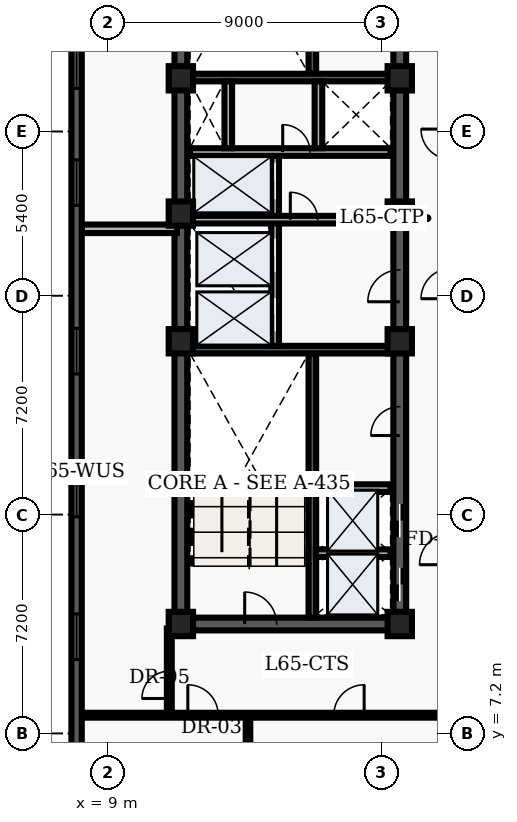
"""IFC4 building model, lengths in metres.
Left out: names, types, materials, properties, quantities, classifications, styles, units other than length and angle.
Written with IfcOpenShell. Run it as: python <this file> out.ifc"""

import sys

from ifc_helpers import new_model, entity, si_unit, converted_unit, direction, frame, origin_with_axes, origin_2d_with_axis, place, context, subcontext, project, spatial, polyline, rectangle, outline, extrude, element, fill, save


model = new_model("IFC4")
c1 = context("Model", 3, precision=1e-05, world=origin_with_axes(), true_north=direction((0.0, 1.0)))
c2 = subcontext(c1, "Body", "Model", "MODEL_VIEW")
j1 = project(units=[si_unit("LENGTHUNIT", "METRE"), converted_unit("PLANEANGLEUNIT", "DEGREE", entity("IfcPlaneAngleMeasure", 0.017), si_unit("PLANEANGLEUNIT", "RADIAN"), dimensions=[0, 0, 0, 0, 0, 0, 0])], contexts=[c1])
p1 = place(None, origin_with_axes())
s1 = spatial("IfcSite", under=j1, at=p1, CompositionType="ELEMENT")
p2 = place(p1, origin_with_axes())
s2 = spatial("IfcBuilding", under=s1, at=p2, CompositionType="ELEMENT")
p3 = place(p2, frame((0.0, 0.0, 264.6), z_axis=(0.0, 0.0, 1.0), x_axis=(1.0, 0.0, 0.0)))
s3 = spatial("IfcBuildingStorey", under=s2, at=p3, CompositionType="ELEMENT", Elevation=264.6)
p4 = place(p3, frame((11.4, 10.8, 0.0), z_axis=(0.0, 0.0, 1.0), x_axis=(0.0, 1.0, 0.0)))
e1 = element("IfcWall", 1, at=p4, inside=s3, PredefinedType="SHEAR", context=c2, shape_type="SweptSolid", body=[
    extrude(outline(polyline([(0.0, -0.21), (27.0, -0.21), (27.0, 0.21), (0.0, 0.21), (0.0, -0.21)])), origin_with_axes(), (0.0, 0.0, 1.0), 3.66),
])
p5 = place(p3, frame((11.4, 10.8, 0.0), z_axis=(0.0, 0.0, 1.0), x_axis=(1.0, 0.0, 0.0)))
e2 = element("IfcWall", 2, at=p5, inside=s3, PredefinedType="SHEAR", context=c2, shape_type="SweptSolid", body=[
    extrude(outline(polyline([(0.0, -0.21), (7.2, -0.21), (7.2, 0.21), (0.0, 0.21), (0.0, -0.21)])), origin_with_axes(), (0.0, 0.0, 1.0), 3.66),
])
p6 = place(p5, frame((2.625, 0.0, 0.0), z_axis=(0.0, 0.0, 1.0), x_axis=(1.0, 0.0, 0.0)))
e3 = element("IfcOpeningElement", 3, at=p6, cuts=e2, PredefinedType="OPENING", context=c2, shape_type="SweptSolid", body=[
    extrude(rectangle(XDim=1.05, YDim=0.44, at=origin_2d_with_axis()), origin_with_axes(), (0.0, 0.0, 1.0), 2.15),
])
p7 = place(p3, frame((18.6, 10.8, 0.0), z_axis=(0.0, 0.0, 1.0), x_axis=(0.0, 1.0, 0.0)))
e4 = element("IfcWall", 4, at=p7, inside=s3, PredefinedType="SHEAR", context=c2, shape_type="SweptSolid", body=[
    extrude(outline(polyline([(0.0, -0.21), (13.5, -0.21), (13.5, 0.21), (0.0, 0.21), (0.0, -0.21)])), origin_with_axes(), (0.0, 0.0, 1.0), 3.66),
])
p8 = place(p7, frame((1.3, 0.0, 0.0), z_axis=(0.0, 0.0, 1.0), x_axis=(1.0, 0.0, 0.0)))
e5 = element("IfcOpeningElement", 5, at=p8, cuts=e4, PredefinedType="OPENING", context=c2, shape_type="SweptSolid", body=[
    extrude(rectangle(XDim=1.1, YDim=0.44, at=origin_2d_with_axis()), origin_with_axes(), (0.0, 0.0, 1.0), 2.15),
])
p9 = place(p7, frame((3.4, 0.0, 0.0), z_axis=(0.0, 0.0, 1.0), x_axis=(1.0, 0.0, 0.0)))
e6 = element("IfcOpeningElement", 6, at=p9, cuts=e4, PredefinedType="OPENING", context=c2, shape_type="SweptSolid", body=[
    extrude(rectangle(XDim=1.1, YDim=0.44, at=origin_2d_with_axis()), origin_with_axes(), (0.0, 0.0, 1.0), 2.15),
])
p10 = place(p7, frame((11.125, 0.0, 0.0), z_axis=(0.0, 0.0, 1.0), x_axis=(1.0, 0.0, 0.0)))
e7 = element("IfcOpeningElement", 7, at=p10, cuts=e4, PredefinedType="OPENING", context=c2, shape_type="SweptSolid", body=[
    extrude(rectangle(XDim=1.05, YDim=0.44, at=origin_2d_with_axis()), origin_with_axes(), (0.0, 0.0, 1.0), 2.15),
])
p11 = place(p7, frame((6.675, 0.0, 0.0), z_axis=(0.0, 0.0, 1.0), x_axis=(1.0, 0.0, 0.0)))
e8 = element("IfcOpeningElement", 8, at=p11, cuts=e4, PredefinedType="OPENING", context=c2, shape_type="SweptSolid", body=[
    extrude(rectangle(XDim=0.95, YDim=0.44, at=origin_2d_with_axis()), origin_with_axes(), (0.0, 0.0, 1.0), 2.15),
])
p12 = place(p3, frame((18.6, 24.3, 0.0), z_axis=(0.0, 0.0, 1.0), x_axis=(0.0, 1.0, 0.0)))
e9 = element("IfcWall", 9, at=p12, inside=s3, PredefinedType="SHEAR", context=c2, shape_type="SweptSolid", body=[
    extrude(outline(polyline([(0.0, -0.21), (13.5, -0.21), (13.5, 0.21), (0.0, 0.21), (0.0, -0.21)])), origin_with_axes(), (0.0, 0.0, 1.0), 3.66),
])
p13 = place(p12, frame((8.525, 0.0, 0.0), z_axis=(0.0, 0.0, 1.0), x_axis=(1.0, 0.0, 0.0)))
e10 = element("IfcOpeningElement", 10, at=p13, cuts=e9, PredefinedType="OPENING", context=c2, shape_type="SweptSolid", body=[
    extrude(rectangle(XDim=1.05, YDim=0.44, at=origin_2d_with_axis()), origin_with_axes(), (0.0, 0.0, 1.0), 2.15),
])
p14 = place(p3, frame((15.725, 11.01, 0.0), z_axis=(0.0, 0.0, 1.0), x_axis=(0.0, 1.0, 0.0)))
e11 = element("IfcWall", 11, at=p14, inside=s3, PredefinedType="SHEAR", context=c2, shape_type="SweptSolid", body=[
    extrude(outline(polyline([(0.0, -0.125), (8.69, -0.125), (8.69, 0.125), (0.0, 0.125), (0.0, -0.125)])), origin_with_axes(), (0.0, 0.0, 1.0), 3.66),
])
p15 = place(p3, frame((11.61, 19.825, 0.0), z_axis=(0.0, 0.0, 1.0), x_axis=(1.0, 0.0, 0.0)))
e12 = element("IfcWall", 12, at=p15, inside=s3, PredefinedType="SHEAR", context=c2, shape_type="SweptSolid", body=[
    extrude(outline(polyline([(0.0, -0.125), (6.78, -0.125), (6.78, 0.125), (0.0, 0.125), (0.0, -0.125)])), origin_with_axes(), (0.0, 0.0, 1.0), 3.66),
])
p16 = place(p3, frame((15.725, 28.9, 0.0), z_axis=(0.0, 0.0, 1.0), x_axis=(0.0, 1.0, 0.0)))
e13 = element("IfcWall", 13, at=p16, inside=s3, PredefinedType="SHEAR", context=c2, shape_type="SweptSolid", body=[
    extrude(outline(polyline([(0.0, -0.125), (8.69, -0.125), (8.69, 0.125), (0.0, 0.125), (0.0, -0.125)])), origin_with_axes(), (0.0, 0.0, 1.0), 3.66),
])
p17 = place(p3, frame((11.61, 28.775, 0.0), z_axis=(0.0, 0.0, 1.0), x_axis=(1.0, 0.0, 0.0)))
e14 = element("IfcWall", 14, at=p17, inside=s3, PredefinedType="SHEAR", context=c2, shape_type="SweptSolid", body=[
    extrude(outline(polyline([(0.0, -0.125), (6.78, -0.125), (6.78, 0.125), (0.0, 0.125), (0.0, -0.125)])), origin_with_axes(), (0.0, 0.0, 1.0), 3.66),
])
p18 = place(p3, frame((14.5, 19.95, 0.0), z_axis=(0.0, 0.0, 1.0), x_axis=(0.0, 1.0, 0.0)))
e15 = element("IfcWall", 15, at=p18, inside=s3, PredefinedType="SOLIDWALL", context=c2, shape_type="SweptSolid", body=[
    extrude(outline(polyline([(0.0, -0.125), (6.25, -0.125), (6.25, 0.125), (0.0, 0.125), (0.0, -0.125)])), origin_with_axes(), (0.0, 0.0, 1.0), 2.7),
])
p19 = place(p18, frame((1.025, 0.0, 0.0), z_axis=(0.0, 0.0, 1.0), x_axis=(1.0, 0.0, 0.0)))
e16 = element("IfcOpeningElement", 16, at=p19, cuts=e15, PredefinedType="OPENING", context=c2, shape_type="SweptSolid", body=[
    extrude(rectangle(XDim=1.1, YDim=0.27, at=origin_2d_with_axis()), origin_with_axes(), (0.0, 0.0, 1.0), 2.15),
])
p20 = place(p18, frame((2.975, 0.0, 0.0), z_axis=(0.0, 0.0, 1.0), x_axis=(1.0, 0.0, 0.0)))
e17 = element("IfcOpeningElement", 17, at=p20, cuts=e15, PredefinedType="OPENING", context=c2, shape_type="SweptSolid", body=[
    extrude(rectangle(XDim=1.1, YDim=0.27, at=origin_2d_with_axis()), origin_with_axes(), (0.0, 0.0, 1.0), 2.15),
])
p21 = place(p18, frame((5.425, 0.0, 0.0), z_axis=(0.0, 0.0, 1.0), x_axis=(1.0, 0.0, 0.0)))
e18 = element("IfcOpeningElement", 18, at=p21, cuts=e15, PredefinedType="OPENING", context=c2, shape_type="SweptSolid", body=[
    extrude(rectangle(XDim=1.2, YDim=0.27, at=origin_2d_with_axis()), origin_with_axes(), (0.0, 0.0, 1.0), 2.15),
])
p22 = place(p3, frame((11.7, 24.1, 0.0), z_axis=(0.0, 0.0, 1.0), x_axis=(1.0, 0.0, 0.0)))
e19 = element("IfcWall", 19, at=p22, inside=s3, PredefinedType="SOLIDWALL", context=c2, shape_type="SweptSolid", body=[
    extrude(outline(polyline([(0.0, -0.125), (6.6, -0.125), (6.6, 0.125), (0.0, 0.125), (0.0, -0.125)])), origin_with_axes(), (0.0, 0.0, 1.0), 2.7),
])
p23 = place(p22, frame((3.75, 0.0, 0.0), z_axis=(0.0, 0.0, 1.0), x_axis=(1.0, 0.0, 0.0)))
e20 = element("IfcOpeningElement", 20, at=p23, cuts=e19, PredefinedType="OPENING", context=c2, shape_type="SweptSolid", body=[
    extrude(rectangle(XDim=0.9, YDim=0.27, at=origin_2d_with_axis()), origin_with_axes(), (0.0, 0.0, 1.0), 2.15),
])
p24 = place(p3, frame((11.7, 26.325, 0.0), z_axis=(0.0, 0.0, 1.0), x_axis=(1.0, 0.0, 0.0)))
e21 = element("IfcWall", 21, at=p24, inside=s3, PredefinedType="SOLIDWALL", context=c2, shape_type="SweptSolid", body=[
    extrude(outline(polyline([(0.0, -0.125), (6.6, -0.125), (6.6, 0.125), (0.0, 0.125), (0.0, -0.125)])), origin_with_axes(), (0.0, 0.0, 1.0), 2.7),
])
p25 = place(p24, frame((3.5, 0.0, 0.0), z_axis=(0.0, 0.0, 1.0), x_axis=(1.0, 0.0, 0.0)))
e22 = element("IfcOpeningElement", 22, at=p25, cuts=e21, PredefinedType="OPENING", context=c2, shape_type="SweptSolid", body=[
    extrude(rectangle(XDim=0.9, YDim=0.27, at=origin_2d_with_axis()), origin_with_axes(), (0.0, 0.0, 1.0), 2.15),
])
for number, where, z_axis, x_axis in (
    (23, (12.96, 26.45, 0.0), (0.0, 0.0, 1.0), (0.0, 1.0, 0.0)),
    (24, (15.925, 26.45, 0.0), (0.0, 0.0, 1.0), (0.0, 1.0, 0.0)),
):
    element("IfcWall", number, at=place(p3, frame(where, z_axis=z_axis, x_axis=x_axis)), inside=s3, PredefinedType="SOLIDWALL", context=c2, shape_type="SweptSolid", body=[
        extrude(outline(polyline([(0.0, -0.125), (2.2, -0.125), (2.2, 0.125), (0.0, 0.125), (0.0, -0.125)])), origin_with_axes(), (0.0, 0.0, 1.0), 2.7),
    ])
for number, where, z_axis, x_axis in (
    (25, (11.4, 10.8, 0.0), (0.0, 0.0, 1.0), (1.0, 0.0, 0.0)),
    (26, (11.4, 20.1, 0.0), (0.0, 0.0, 1.0), (1.0, 0.0, 0.0)),
    (27, (11.4, 24.3, 0.0), (0.0, 0.0, 1.0), (1.0, 0.0, 0.0)),
    (28, (11.4, 28.75, 0.0), (0.0, 0.0, 1.0), (1.0, 0.0, 0.0)),
    (29, (18.6, 10.8, 0.0), (0.0, 0.0, 1.0), (1.0, 0.0, 0.0)),
    (30, (18.6, 20.1, 0.0), (0.0, 0.0, 1.0), (1.0, 0.0, 0.0)),
    (31, (18.6, 24.3, 0.0), (0.0, 0.0, 1.0), (1.0, 0.0, 0.0)),
    (32, (18.6, 28.75, 0.0), (0.0, 0.0, 1.0), (1.0, 0.0, 0.0)),
):
    element("IfcColumn", number, at=place(p3, frame(where, z_axis=z_axis, x_axis=x_axis)), inside=s3, PredefinedType="COLUMN", context=c2, shape_type="SweptSolid", body=[
        extrude(rectangle(XDim=0.8, YDim=0.8, at=origin_2d_with_axis()), origin_with_axes(), (0.0, 0.0, 1.0), 3.9),
    ])
for number, where, z_axis, x_axis in (
    (33, (15.84, 13.13, 0.0), (0.0, 0.0, 1.0), (1.0, 0.0, 0.0)),
    (34, (15.84, 15.27, 0.0), (0.0, 0.0, 1.0), (1.0, 0.0, 0.0)),
):
    element("IfcWall", number, at=place(p3, frame(where, z_axis=z_axis, x_axis=x_axis)), inside=s3, PredefinedType="SOLIDWALL", context=c2, shape_type="SweptSolid", body=[
        extrude(outline(polyline([(0.0, -0.125), (2.46, -0.125), (2.46, 0.125), (0.0, 0.125), (0.0, -0.125)])), origin_with_axes(), (0.0, 0.0, 1.0), 2.7),
    ])
p26 = place(p3, frame((8.135, 7.8, 0.0), z_axis=(0.0, 0.0, 1.0), x_axis=(1.0, 0.0, 0.0)))
e35 = element("IfcWall", 35, at=p26, inside=s3, PredefinedType="PARTITIONING", context=c2, shape_type="SweptSolid", body=[
    extrude(outline(polyline([(0.0, -0.08), (12.165, -0.08), (12.165, 0.08), (0.0, 0.08), (0.0, -0.08)])), origin_with_axes(), (0.0, 0.0, 1.0), 2.7),
])
p27 = place(p26, frame((3.994, 0.0, 0.0), z_axis=(0.0, 0.0, 1.0), x_axis=(1.0, 0.0, 0.0)))
e36 = element("IfcOpeningElement", 36, at=p27, cuts=e35, PredefinedType="OPENING", context=c2, shape_type="SweptSolid", body=[
    extrude(rectangle(XDim=1.0, YDim=0.18, at=origin_2d_with_axis()), origin_with_axes(), (0.0, 0.0, 1.0), 2.15),
])
p28 = place(p26, frame((8.794, 0.0, 0.0), z_axis=(0.0, 0.0, 1.0), x_axis=(1.0, 0.0, 0.0)))
e37 = element("IfcOpeningElement", 37, at=p28, cuts=e35, PredefinedType="OPENING", context=c2, shape_type="SweptSolid", body=[
    extrude(rectangle(XDim=1.0, YDim=0.18, at=origin_2d_with_axis()), origin_with_axes(), (0.0, 0.0, 1.0), 2.15),
])
p29 = place(p3, frame((11.02, 7.8, 0.0), z_axis=(0.0, 0.0, 1.0), x_axis=(0.0, 1.0, 0.0)))
e38 = element("IfcWall", 38, at=p29, inside=s3, PredefinedType="PARTITIONING", context=c2, shape_type="SweptSolid", body=[
    extrude(outline(polyline([(0.0, -0.08), (2.85, -0.08), (2.85, 0.08), (0.0, 0.08), (0.0, -0.08)])), origin_with_axes(), (0.0, 0.0, 1.0), 2.7),
])
p30 = place(p29, frame((1.0, 0.0, 0.0), z_axis=(0.0, 0.0, 1.0), x_axis=(1.0, 0.0, 0.0)))
e39 = element("IfcOpeningElement", 39, at=p30, cuts=e38, PredefinedType="OPENING", context=c2, shape_type="SweptSolid", body=[
    extrude(rectangle(XDim=0.9, YDim=0.18, at=origin_2d_with_axis()), origin_with_axes(), (0.0, 0.0, 1.0), 2.15),
])
p31 = place(p3, frame((8.135, 23.8, 0.0), z_axis=(0.0, 0.0, 1.0), x_axis=(1.0, 0.0, 0.0)))
e40 = element("IfcWall", 40, at=p31, inside=s3, PredefinedType="PARTITIONING", context=c2, shape_type="SweptSolid", body=[
    extrude(outline(polyline([(0.0, -0.14), (3.135, -0.14), (3.135, 0.14), (0.0, 0.14), (0.0, -0.14)])), origin_with_axes(), (0.0, 0.0, 1.0), 2.7),
])
p32 = place(p3, frame((13.608, 2.58, 0.0), z_axis=(0.0, 0.0, 1.0), x_axis=(0.0, 1.0, 0.0)))
e41 = element("IfcWall", 41, at=p32, inside=s3, PredefinedType="PARTITIONING", context=c2, shape_type="SweptSolid", body=[
    extrude(outline(polyline([(0.0, -0.075), (5.12, -0.075), (5.12, 0.075), (0.0, 0.075), (0.0, -0.075)])), origin_with_axes(), (0.0, 0.0, 1.0), 2.7),
])
p33 = place(p3, frame((7.97, 2.74, 0.0), z_axis=(0.0, 0.0, 1.0), x_axis=(0.0, 1.0, 0.0)))
e42 = element("IfcWall", 42, at=p33, inside=s3, PredefinedType="SOLIDWALL", context=c2, shape_type="SweptSolid", body=[
    extrude(outline(polyline([(0.0, -0.17), (43.46, -0.17), (43.46, 0.17), (0.0, 0.17), (0.0, -0.17)])), origin_with_axes(), (0.0, 0.0, 1.0), 3.66),
])
p34 = place(p33, frame((2.948, 0.0, 0.45), z_axis=(0.0, 0.0, 1.0), x_axis=(1.0, 0.0, 0.0)))
e43 = element("IfcOpeningElement", 43, at=p34, cuts=e42, PredefinedType="OPENING", context=c2, shape_type="SweptSolid", body=[
    extrude(rectangle(XDim=1.5, YDim=0.36, at=origin_2d_with_axis()), origin_with_axes(), (0.0, 0.0, 1.0), 2.1),
])
p35 = place(p33, frame((7.643, 0.0, 0.45), z_axis=(0.0, 0.0, 1.0), x_axis=(1.0, 0.0, 0.0)))
e44 = element("IfcOpeningElement", 44, at=p35, cuts=e42, PredefinedType="OPENING", context=c2, shape_type="SweptSolid", body=[
    extrude(rectangle(XDim=1.5, YDim=0.36, at=origin_2d_with_axis()), origin_with_axes(), (0.0, 0.0, 1.0), 2.1),
])
p36 = place(p33, frame((12.339, 0.0, 0.45), z_axis=(0.0, 0.0, 1.0), x_axis=(1.0, 0.0, 0.0)))
e45 = element("IfcOpeningElement", 45, at=p36, cuts=e42, PredefinedType="OPENING", context=c2, shape_type="SweptSolid", body=[
    extrude(rectangle(XDim=1.5, YDim=0.36, at=origin_2d_with_axis()), origin_with_axes(), (0.0, 0.0, 1.0), 2.1),
])
p37 = place(p33, frame((17.034, 0.0, 0.45), z_axis=(0.0, 0.0, 1.0), x_axis=(1.0, 0.0, 0.0)))
e46 = element("IfcOpeningElement", 46, at=p37, cuts=e42, PredefinedType="OPENING", context=c2, shape_type="SweptSolid", body=[
    extrude(rectangle(XDim=1.5, YDim=0.36, at=origin_2d_with_axis()), origin_with_axes(), (0.0, 0.0, 1.0), 2.1),
])
p38 = place(p33, frame((22.58, 0.0, 0.45), z_axis=(0.0, 0.0, 1.0), x_axis=(1.0, 0.0, 0.0)))
e47 = element("IfcOpeningElement", 47, at=p38, cuts=e42, PredefinedType="OPENING", context=c2, shape_type="SweptSolid", body=[
    extrude(rectangle(XDim=1.5, YDim=0.36, at=origin_2d_with_axis()), origin_with_axes(), (0.0, 0.0, 1.0), 2.1),
])
p39 = place(p33, frame((26.426, 0.0, 0.45), z_axis=(0.0, 0.0, 1.0), x_axis=(1.0, 0.0, 0.0)))
e48 = element("IfcOpeningElement", 48, at=p39, cuts=e42, PredefinedType="OPENING", context=c2, shape_type="SweptSolid", body=[
    extrude(rectangle(XDim=1.5, YDim=0.36, at=origin_2d_with_axis()), origin_with_axes(), (0.0, 0.0, 1.0), 2.1),
])
p40 = place(p33, frame((31.121, 0.0, 0.45), z_axis=(0.0, 0.0, 1.0), x_axis=(1.0, 0.0, 0.0)))
e49 = element("IfcOpeningElement", 49, at=p40, cuts=e42, PredefinedType="OPENING", context=c2, shape_type="SweptSolid", body=[
    extrude(rectangle(XDim=1.5, YDim=0.36, at=origin_2d_with_axis()), origin_with_axes(), (0.0, 0.0, 1.0), 2.1),
])
p41 = place(p33, frame((35.817, 0.0, 0.45), z_axis=(0.0, 0.0, 1.0), x_axis=(1.0, 0.0, 0.0)))
e50 = element("IfcOpeningElement", 50, at=p41, cuts=e42, PredefinedType="OPENING", context=c2, shape_type="SweptSolid", body=[
    extrude(rectangle(XDim=1.5, YDim=0.36, at=origin_2d_with_axis()), origin_with_axes(), (0.0, 0.0, 1.0), 2.1),
])
p42 = place(p33, frame((40.512, 0.0, 0.45), z_axis=(0.0, 0.0, 1.0), x_axis=(1.0, 0.0, 0.0)))
e51 = element("IfcOpeningElement", 51, at=p42, cuts=e42, PredefinedType="OPENING", context=c2, shape_type="SweptSolid", body=[
    extrude(rectangle(XDim=1.5, YDim=0.36, at=origin_2d_with_axis()), origin_with_axes(), (0.0, 0.0, 1.0), 2.1),
])
p43 = place(p7, frame((1.3, 0.0, 0.0), z_axis=(0.0, 0.0, 1.0), x_axis=(1.0, 0.0, 0.0)))
e52 = element("IfcDoor", 52, at=p43, inside=s3, OperationType="SLIDING_TO_LEFT", PredefinedType="DOOR", context=c2, shape_type="SweptSolid", body=[
    extrude(rectangle(XDim=1.1, YDim=0.09, at=origin_2d_with_axis()), origin_with_axes(), (0.0, 0.0, 1.0), 2.15),
])
fill(e5, e52)
p44 = place(p7, frame((3.4, 0.0, 0.0), z_axis=(0.0, 0.0, 1.0), x_axis=(1.0, 0.0, 0.0)))
e53 = element("IfcDoor", 53, at=p44, inside=s3, OperationType="SLIDING_TO_RIGHT", PredefinedType="DOOR", context=c2, shape_type="SweptSolid", body=[
    extrude(rectangle(XDim=1.1, YDim=0.09, at=origin_2d_with_axis()), origin_with_axes(), (0.0, 0.0, 1.0), 2.15),
])
fill(e6, e53)
p45 = place(p18, frame((1.025, 0.0, 0.0), z_axis=(0.0, 0.0, 1.0), x_axis=(1.0, 0.0, 0.0)))
e54 = element("IfcDoor", 54, at=p45, inside=s3, OperationType="SLIDING_TO_LEFT", PredefinedType="DOOR", context=c2, shape_type="SweptSolid", body=[
    extrude(rectangle(XDim=1.1, YDim=0.09, at=origin_2d_with_axis()), origin_with_axes(), (0.0, 0.0, 1.0), 2.15),
])
fill(e16, e54)
p46 = place(p18, frame((2.975, 0.0, 0.0), z_axis=(0.0, 0.0, 1.0), x_axis=(1.0, 0.0, 0.0)))
e55 = element("IfcDoor", 55, at=p46, inside=s3, OperationType="SLIDING_TO_RIGHT", PredefinedType="DOOR", context=c2, shape_type="SweptSolid", body=[
    extrude(rectangle(XDim=1.1, YDim=0.09, at=origin_2d_with_axis()), origin_with_axes(), (0.0, 0.0, 1.0), 2.15),
])
fill(e17, e55)
p47 = place(p18, frame((5.425, 0.0, 0.0), z_axis=(0.0, 0.0, 1.0), x_axis=(1.0, 0.0, 0.0)))
e56 = element("IfcDoor", 56, at=p47, inside=s3, OperationType="DOUBLE_DOOR_SLIDING", PredefinedType="DOOR", context=c2, shape_type="SweptSolid", body=[
    extrude(rectangle(XDim=1.2, YDim=0.09, at=origin_2d_with_axis()), origin_with_axes(), (0.0, 0.0, 1.0), 2.15),
])
fill(e18, e56)
p48 = place(p5, frame((2.625, 0.0, 0.0), z_axis=(0.0, 0.0, 1.0), x_axis=(1.0, 0.0, 0.0)))
e57 = element("IfcDoor", 57, at=p48, inside=s3, OperationType="SINGLE_SWING_LEFT", PredefinedType="DOOR", context=c2, shape_type="SweptSolid", body=[
    extrude(rectangle(XDim=1.05, YDim=0.09, at=origin_2d_with_axis()), origin_with_axes(), (0.0, 0.0, 1.0), 2.15),
])
fill(e3, e57)
p49 = place(p7, frame((11.125, 0.0, 0.0), z_axis=(0.0, 0.0, 1.0), x_axis=(1.0, 0.0, 0.0)))
e58 = element("IfcDoor", 58, at=p49, inside=s3, OperationType="SINGLE_SWING_LEFT", PredefinedType="DOOR", context=c2, shape_type="SweptSolid", body=[
    extrude(rectangle(XDim=1.05, YDim=0.09, at=origin_2d_with_axis()), origin_with_axes(), (0.0, 0.0, 1.0), 2.15),
])
fill(e7, e58)
p50 = place(p22, frame((3.75, 0.0, 0.0), z_axis=(0.0, 0.0, 1.0), x_axis=(1.0, 0.0, 0.0)))
e59 = element("IfcDoor", 59, at=p50, inside=s3, OperationType="SINGLE_SWING_LEFT", PredefinedType="DOOR", context=c2, shape_type="SweptSolid", body=[
    extrude(rectangle(XDim=0.9, YDim=0.09, at=origin_2d_with_axis()), origin_with_axes(), (0.0, 0.0, 1.0), 2.15),
])
fill(e20, e59)
p51 = place(p24, frame((3.5, 0.0, 0.0), z_axis=(0.0, 0.0, 1.0), x_axis=(1.0, 0.0, 0.0)))
e60 = element("IfcDoor", 60, at=p51, inside=s3, OperationType="SINGLE_SWING_LEFT", PredefinedType="DOOR", context=c2, shape_type="SweptSolid", body=[
    extrude(rectangle(XDim=0.9, YDim=0.09, at=origin_2d_with_axis()), origin_with_axes(), (0.0, 0.0, 1.0), 2.15),
])
fill(e22, e60)
p52 = place(p7, frame((6.675, 0.0, 0.0), z_axis=(0.0, 0.0, 1.0), x_axis=(1.0, 0.0, 0.0)))
e61 = element("IfcDoor", 61, at=p52, inside=s3, OperationType="SINGLE_SWING_LEFT", PredefinedType="DOOR", context=c2, shape_type="SweptSolid", body=[
    extrude(rectangle(XDim=0.95, YDim=0.09, at=origin_2d_with_axis()), origin_with_axes(), (0.0, 0.0, 1.0), 2.15),
])
fill(e8, e61)
p53 = place(p29, frame((1.0, 0.0, 0.0), z_axis=(0.0, 0.0, 1.0), x_axis=(1.0, 0.0, 0.0)))
e62 = element("IfcDoor", 62, at=p53, inside=s3, OperationType="SINGLE_SWING_LEFT", PredefinedType="DOOR", context=c2, shape_type="SweptSolid", body=[
    extrude(rectangle(XDim=0.9, YDim=0.09, at=origin_2d_with_axis()), origin_with_axes(), (0.0, 0.0, 1.0), 2.15),
])
fill(e39, e62)
p54 = place(p26, frame((3.994, 0.0, 0.0), z_axis=(0.0, 0.0, 1.0), x_axis=(1.0, 0.0, 0.0)))
e63 = element("IfcDoor", 63, at=p54, inside=s3, OperationType="SINGLE_SWING_LEFT", PredefinedType="DOOR", context=c2, shape_type="SweptSolid", body=[
    extrude(rectangle(XDim=1.0, YDim=0.09, at=origin_2d_with_axis()), origin_with_axes(), (0.0, 0.0, 1.0), 2.15),
])
fill(e36, e63)
p55 = place(p26, frame((8.794, 0.0, 0.0), z_axis=(0.0, 0.0, 1.0), x_axis=(1.0, 0.0, 0.0)))
e64 = element("IfcDoor", 64, at=p55, inside=s3, OperationType="SINGLE_SWING_RIGHT", PredefinedType="DOOR", context=c2, shape_type="SweptSolid", body=[
    extrude(rectangle(XDim=1.0, YDim=0.09, at=origin_2d_with_axis()), origin_with_axes(), (0.0, 0.0, 1.0), 2.15),
])
fill(e37, e64)
p56 = place(p33, frame((7.643, 0.0, 0.45), z_axis=(0.0, 0.0, 1.0), x_axis=(1.0, 0.0, 0.0)))
e65 = element("IfcWindow", 65, at=p56, inside=s3, PredefinedType="WINDOW", context=c2, shape_type="SweptSolid", body=[
    extrude(rectangle(XDim=1.5, YDim=0.09, at=origin_2d_with_axis()), origin_with_axes(), (0.0, 0.0, 1.0), 2.1),
])
fill(e44, e65)
p57 = place(p33, frame((12.339, 0.0, 0.45), z_axis=(0.0, 0.0, 1.0), x_axis=(1.0, 0.0, 0.0)))
e66 = element("IfcWindow", 66, at=p57, inside=s3, PredefinedType="WINDOW", context=c2, shape_type="SweptSolid", body=[
    extrude(rectangle(XDim=1.5, YDim=0.09, at=origin_2d_with_axis()), origin_with_axes(), (0.0, 0.0, 1.0), 2.1),
])
fill(e45, e66)
p58 = place(p33, frame((17.034, 0.0, 0.45), z_axis=(0.0, 0.0, 1.0), x_axis=(1.0, 0.0, 0.0)))
e67 = element("IfcWindow", 67, at=p58, inside=s3, PredefinedType="WINDOW", context=c2, shape_type="SweptSolid", body=[
    extrude(rectangle(XDim=1.5, YDim=0.09, at=origin_2d_with_axis()), origin_with_axes(), (0.0, 0.0, 1.0), 2.1),
])
fill(e46, e67)
p59 = place(p33, frame((22.58, 0.0, 0.45), z_axis=(0.0, 0.0, 1.0), x_axis=(1.0, 0.0, 0.0)))
e68 = element("IfcWindow", 68, at=p59, inside=s3, PredefinedType="WINDOW", context=c2, shape_type="SweptSolid", body=[
    extrude(rectangle(XDim=1.5, YDim=0.09, at=origin_2d_with_axis()), origin_with_axes(), (0.0, 0.0, 1.0), 2.1),
])
fill(e47, e68)
p60 = place(p33, frame((26.426, 0.0, 0.45), z_axis=(0.0, 0.0, 1.0), x_axis=(1.0, 0.0, 0.0)))
e69 = element("IfcWindow", 69, at=p60, inside=s3, PredefinedType="WINDOW", context=c2, shape_type="SweptSolid", body=[
    extrude(rectangle(XDim=1.5, YDim=0.09, at=origin_2d_with_axis()), origin_with_axes(), (0.0, 0.0, 1.0), 2.1),
])
fill(e48, e69)
save(model, sys.argv[1])
